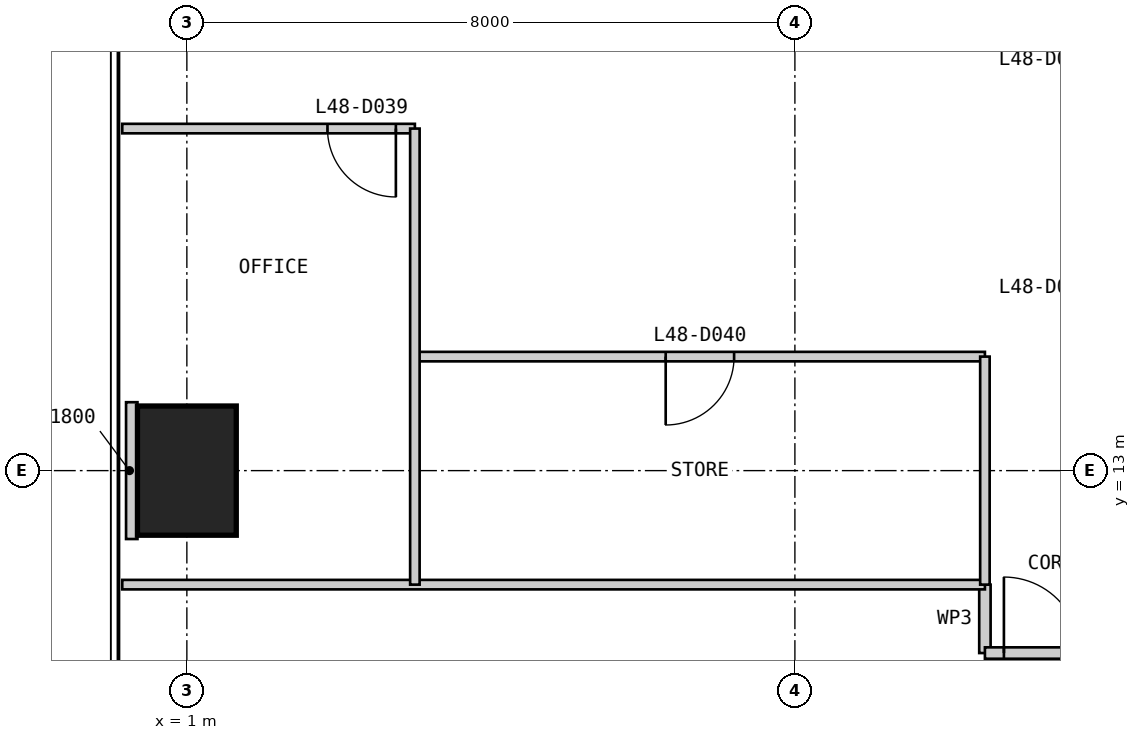
"""IFC4 building model, lengths in metres.
Left out: names, types, materials, properties, quantities, classifications, styles, units other than length and angle.
Written with IfcOpenShell. Run it as: python <this file> out.ifc"""

import sys

from ifc_helpers import new_model, si_unit, direction, frame, frame_2d, origin, origin_2d, place, context, subcontext, project, spatial, rectangle, extrude, element, fill, save


model = new_model("IFC4")
c1 = context("Model", 3, precision=1e-05, world=origin(), true_north=direction((0.0, 1.0)))
c2 = subcontext(c1, "Body", "Model", "MODEL_VIEW")
j1 = project(units=[si_unit("LENGTHUNIT", "METRE"), si_unit("PLANEANGLEUNIT", "RADIAN")], contexts=[c1])
p1 = place(None, origin())
s1 = spatial("IfcSite", under=j1, at=p1, CompositionType="ELEMENT")
p2 = place(p1, origin())
s2 = spatial("IfcBuilding", under=s1, at=p2, CompositionType="ELEMENT")
p3 = place(p2, frame((0.0, 0.0, 205.8)))
s3 = spatial("IfcBuildingStorey", under=s2, at=p3, CompositionType="ELEMENT", Elevation=205.8)
p4 = place(p3, frame((1.0, 13.0, 0.0), z_axis=(0.0, 0.0, 1.0), x_axis=(1.0, 0.0, 0.0)))
e1 = element("IfcColumn", 1, at=p4, inside=s3, PredefinedType="COLUMN", context=c2, shape_type="SweptSolid", body=[
    extrude(rectangle(XDim=1.3, YDim=1.7, at=origin_2d()), origin(), (0.0, 0.0, 1.0), 4.0),
])
p5 = place(p3, frame((11.5, 11.5, 0.0), z_axis=(0.0, 0.0, 1.0), x_axis=(0.0, -1.0, 0.0)))
e2 = element("IfcWall", 2, at=p5, inside=s3, PredefinedType="PARTITIONING", context=c2, shape_type="SweptSolid", body=[
    extrude(rectangle(XDim=0.9, YDim=0.15, at=frame_2d((0.45, 0.0))), origin(), (0.0, 0.0, 1.0), 3.85),
])
p6 = place(p3, frame((11.5, 10.6, 0.0), z_axis=(0.0, 0.0, 1.0), x_axis=(1.0, 0.0, 0.0)))
e3 = element("IfcWall", 3, at=p6, inside=s3, PredefinedType="PARTITIONING", context=c2, shape_type="SweptSolid", body=[
    extrude(rectangle(XDim=27.0, YDim=0.15, at=frame_2d((13.5, 0.0))), origin(), (0.0, 0.0, 1.0), 3.85),
])
p7 = place(p6, frame((0.25, 0.0, 0.0)))
e4 = element("IfcOpeningElement", 4, at=p7, cuts=e3, PredefinedType="OPENING", context=c2, shape_type="SweptSolid", body=[
    extrude(rectangle(XDim=1.0, YDim=2.2, at=frame_2d((0.5, 1.1))), frame((0.0, 0.085, 0.0), z_axis=(0.0, -1.0, 0.0), x_axis=(1.0, 0.0, 0.0)), (0.0, 0.0, 1.0), 0.17),
])
p8 = place(p6, frame((22.75, 0.0, 0.0)))
e5 = element("IfcOpeningElement", 5, at=p8, cuts=e3, PredefinedType="OPENING", context=c2, shape_type="SweptSolid", body=[
    extrude(rectangle(XDim=1.0, YDim=2.2, at=frame_2d((0.5, 1.1))), frame((0.0, 0.085, 0.0), z_axis=(0.0, -1.0, 0.0), x_axis=(1.0, 0.0, 0.0)), (0.0, 0.0, 1.0), 0.17),
])
p9 = place(p3, frame((0.15, 11.5, 0.0), z_axis=(0.0, 0.0, 1.0), x_axis=(1.0, 0.0, 0.0)))
e6 = element("IfcWall", 6, at=p9, inside=s3, PredefinedType="PARTITIONING", context=c2, shape_type="SweptSolid", body=[
    extrude(rectangle(XDim=11.35, YDim=0.125, at=frame_2d((5.675, 0.0))), origin(), (0.0, 0.0, 1.0), 3.85),
])
p10 = place(p3, frame((0.15, 17.5, 0.0), z_axis=(0.0, 0.0, 1.0), x_axis=(1.0, 0.0, 0.0)))
e7 = element("IfcWall", 7, at=p10, inside=s3, PredefinedType="PARTITIONING", context=c2, shape_type="SweptSolid", body=[
    extrude(rectangle(XDim=3.85, YDim=0.125, at=frame_2d((1.925, 0.0))), origin(), (0.0, 0.0, 1.0), 3.85),
])
p11 = place(p10, frame((2.7, 0.0, 0.0)))
e8 = element("IfcOpeningElement", 8, at=p11, cuts=e7, PredefinedType="OPENING", context=c2, shape_type="SweptSolid", body=[
    extrude(rectangle(XDim=0.9, YDim=2.2, at=frame_2d((0.45, 1.1))), frame((0.0, 0.073, 0.0), z_axis=(0.0, -1.0, 0.0), x_axis=(1.0, 0.0, 0.0)), (0.0, 0.0, 1.0), 0.145),
])
p12 = place(p3, frame((4.0, 14.5, 0.0), z_axis=(0.0, 0.0, 1.0), x_axis=(1.0, 0.0, 0.0)))
e9 = element("IfcWall", 9, at=p12, inside=s3, PredefinedType="PARTITIONING", context=c2, shape_type="SweptSolid", body=[
    extrude(rectangle(XDim=7.5, YDim=0.125, at=frame_2d((3.75, 0.0))), origin(), (0.0, 0.0, 1.0), 3.85),
])
p13 = place(p12, frame((3.3, 0.0, 0.0)))
e10 = element("IfcOpeningElement", 10, at=p13, cuts=e9, PredefinedType="OPENING", context=c2, shape_type="SweptSolid", body=[
    extrude(rectangle(XDim=0.9, YDim=2.2, at=frame_2d((0.45, 1.1))), frame((0.0, 0.073, 0.0), z_axis=(0.0, -1.0, 0.0), x_axis=(1.0, 0.0, 0.0)), (0.0, 0.0, 1.0), 0.145),
])
p14 = place(p3, frame((4.0, 17.5, 0.0), z_axis=(0.0, 0.0, 1.0), x_axis=(0.0, -1.0, 0.0)))
e11 = element("IfcWall", 11, at=p14, inside=s3, PredefinedType="PARTITIONING", context=c2, shape_type="SweptSolid", body=[
    extrude(rectangle(XDim=6.0, YDim=0.125, at=frame_2d((3.0, 0.0))), origin(), (0.0, 0.0, 1.0), 3.238),
])
p15 = place(p3, frame((11.5, 14.5, 0.0), z_axis=(0.0, 0.0, 1.0), x_axis=(0.0, -1.0, 0.0)))
e12 = element("IfcWall", 12, at=p15, inside=s3, PredefinedType="PARTITIONING", context=c2, shape_type="SweptSolid", body=[
    extrude(rectangle(XDim=3.0, YDim=0.125, at=frame_2d((1.5, 0.0))), origin(), (0.0, 0.0, 1.0), 3.85),
])
p16 = place(p3, frame((0.2, 13.0, 0.0), z_axis=(0.0, 0.0, 1.0), x_axis=(1.0, 0.0, 0.0)))
e13 = element("IfcWall", 13, at=p16, inside=s3, PredefinedType="PARTITIONING", context=c2, shape_type="SweptSolid", body=[
    extrude(rectangle(XDim=0.15, YDim=1.8, at=frame_2d((0.075, 0.0))), origin(), (0.0, 0.0, 1.0), 3.85),
])
p17 = place(p7, origin())
e14 = element("IfcDoor", 14, at=p17, inside=s3, OperationType="SINGLE_SWING_LEFT", PredefinedType="DOOR", context=c2, shape_type="SweptSolid", body=[
    extrude(rectangle(XDim=1.0, YDim=2.2, at=frame_2d((0.5, 1.1))), frame((0.0, 0.025, 0.0), z_axis=(0.0, -1.0, 0.0), x_axis=(1.0, 0.0, 0.0)), (0.0, 0.0, 1.0), 0.05),
])
fill(e4, e14)
p18 = place(p11, frame((0.9, 0.0, 0.0), z_axis=(0.0, 0.0, 1.0), x_axis=(-1.0, 0.0, 0.0)))
e15 = element("IfcDoor", 15, at=p18, inside=s3, OperationType="SINGLE_SWING_LEFT", PredefinedType="DOOR", context=c2, shape_type="SweptSolid", body=[
    extrude(rectangle(XDim=0.9, YDim=2.2, at=frame_2d((0.45, 1.1))), frame((0.0, 0.025, 0.0), z_axis=(0.0, -1.0, 0.0), x_axis=(1.0, 0.0, 0.0)), (0.0, 0.0, 1.0), 0.05),
])
fill(e8, e15)
p19 = place(p13, frame((0.9, 0.0, 0.0), z_axis=(0.0, 0.0, 1.0), x_axis=(-1.0, 0.0, 0.0)))
e16 = element("IfcDoor", 16, at=p19, inside=s3, OperationType="SINGLE_SWING_RIGHT", PredefinedType="DOOR", context=c2, shape_type="SweptSolid", body=[
    extrude(rectangle(XDim=0.9, YDim=2.2, at=frame_2d((0.45, 1.1))), frame((0.0, 0.025, 0.0), z_axis=(0.0, -1.0, 0.0), x_axis=(1.0, 0.0, 0.0)), (0.0, 0.0, 1.0), 0.05),
])
fill(e10, e16)
save(model, sys.argv[1])
